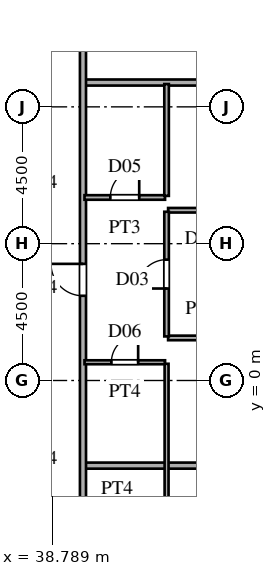
"""IFC4 building model, lengths in metres.
Left out: names, types, materials, properties, quantities, classifications, styles, units other than length and angle.
Written with IfcOpenShell. Run it as: python <this file> out.ifc"""

import sys

from ifc_helpers import new_model, si_unit, direction, frame, frame_2d, origin, place, context, subcontext, project, spatial, rectangle, extrude, source, transform, mapped, element, fill, save


model = new_model("IFC4")
c1 = context("Model", 3, precision=1e-05, world=origin(), true_north=direction((0.0, 1.0)))
c2 = subcontext(c1, "Body", "Model", "MODEL_VIEW")
j1 = project(units=[si_unit("LENGTHUNIT", "METRE"), si_unit("PLANEANGLEUNIT", "RADIAN")], contexts=[c1])
p1 = place(None, origin())
s1 = spatial("IfcSite", under=j1, at=p1, CompositionType="ELEMENT")
p2 = place(p1, origin())
s2 = spatial("IfcBuilding", under=s1, at=p2, CompositionType="ELEMENT")
p3 = place(p2, frame((0.0, 0.0, 117.6)))
s3 = spatial("IfcBuildingStorey", under=s2, at=p3, CompositionType="ELEMENT", Elevation=117.6)
p4 = place(p3, frame((39.88, -2.8, 0.0), z_axis=(0.0, 0.0, 1.0), x_axis=(1.0, 0.0, 0.0)))
e1 = element("IfcWall", 1, at=p4, inside=s3, PredefinedType="PARTITIONING", context=c2, shape_type="SweptSolid", body=[
    extrude(rectangle(XDim=29.625, YDim=0.2, at=frame_2d((14.812, 0.0))), origin(), (0.0, 0.0, 1.0), 3.38),
])
p5 = place(p3, frame((39.85, 0.6, 0.0), z_axis=(0.0, 0.0, 1.0), x_axis=(1.0, 0.0, 0.0)))
e2 = element("IfcWall", 2, at=p5, inside=s3, PredefinedType="PARTITIONING", context=c2, shape_type="SweptSolid", body=[
    extrude(rectangle(XDim=2.65, YDim=0.13, at=frame_2d((1.325, 0.0))), origin(), (0.0, 0.0, 1.0), 3.38),
])
p6 = place(p5, frame((0.885, 0.0, 0.0)))
e3 = element("IfcOpeningElement", 3, at=p6, cuts=e2, PredefinedType="OPENING", context=c2, shape_type="SweptSolid", body=[
    extrude(rectangle(XDim=0.88, YDim=2.1, at=frame_2d((0.44, 1.05))), frame((0.0, 0.075, 0.0), z_axis=(0.0, -1.0, 0.0), x_axis=(1.0, 0.0, 0.0)), (0.0, 0.0, 1.0), 0.15),
])
p7 = place(p3, frame((42.6, 1.4, 0.0), z_axis=(0.0, 0.0, 1.0), x_axis=(1.0, 0.0, 0.0)))
e4 = element("IfcWall", 4, at=p7, inside=s3, PredefinedType="PARTITIONING", context=c2, shape_type="SweptSolid", body=[
    extrude(rectangle(XDim=26.935, YDim=0.15, at=frame_2d((13.467, 0.0))), origin(), (0.0, 0.0, 1.0), 3.38),
])
p8 = place(p7, frame((5.45, 0.0, 0.0)))
e5 = element("IfcOpeningElement", 5, at=p8, cuts=e4, PredefinedType="OPENING", context=c2, shape_type="SweptSolid", body=[
    extrude(rectangle(XDim=0.95, YDim=2.15, at=frame_2d((0.475, 1.075))), frame((0.0, 0.085, 0.0), z_axis=(0.0, -1.0, 0.0), x_axis=(1.0, 0.0, 0.0)), (0.0, 0.0, 1.0), 0.17),
])
p9 = place(p7, frame((14.275, 0.0, 0.0)))
e6 = element("IfcOpeningElement", 6, at=p9, cuts=e4, PredefinedType="OPENING", context=c2, shape_type="SweptSolid", body=[
    extrude(rectangle(XDim=0.95, YDim=2.15, at=frame_2d((0.475, 1.075))), frame((0.0, 0.085, 0.0), z_axis=(0.0, -1.0, 0.0), x_axis=(1.0, 0.0, 0.0)), (0.0, 0.0, 1.0), 0.17),
])
p10 = place(p3, frame((42.6, 5.6, 0.0), z_axis=(0.0, 0.0, 1.0), x_axis=(1.0, 0.0, 0.0)))
e7 = element("IfcWall", 7, at=p10, inside=s3, PredefinedType="PARTITIONING", context=c2, shape_type="SweptSolid", body=[
    extrude(rectangle(XDim=25.766, YDim=0.15, at=frame_2d((12.883, 0.0))), origin(), (0.0, 0.0, 1.0), 3.38),
])
p11 = place(p10, frame((5.45, 0.0, 0.0)))
e8 = element("IfcOpeningElement", 8, at=p11, cuts=e7, PredefinedType="OPENING", context=c2, shape_type="SweptSolid", body=[
    extrude(rectangle(XDim=0.95, YDim=2.15, at=frame_2d((0.475, 1.075))), frame((0.0, 0.085, 0.0), z_axis=(0.0, -1.0, 0.0), x_axis=(1.0, 0.0, 0.0)), (0.0, 0.0, 1.0), 0.17),
])
p12 = place(p10, frame((14.275, 0.0, 0.0)))
e9 = element("IfcOpeningElement", 9, at=p12, cuts=e7, PredefinedType="OPENING", context=c2, shape_type="SweptSolid", body=[
    extrude(rectangle(XDim=0.95, YDim=2.15, at=frame_2d((0.475, 1.075))), frame((0.0, 0.085, 0.0), z_axis=(0.0, -1.0, 0.0), x_axis=(1.0, 0.0, 0.0)), (0.0, 0.0, 1.0), 0.17),
])
p13 = place(p3, frame((39.85, 6.02, 0.0), z_axis=(0.0, 0.0, 1.0), x_axis=(1.0, 0.0, 0.0)))
e10 = element("IfcWall", 10, at=p13, inside=s3, PredefinedType="PARTITIONING", context=c2, shape_type="SweptSolid", body=[
    extrude(rectangle(XDim=2.65, YDim=0.15, at=frame_2d((1.325, 0.0))), origin(), (0.0, 0.0, 1.0), 3.38),
])
p14 = place(p13, frame((0.85, 0.0, 0.0)))
e11 = element("IfcOpeningElement", 11, at=p14, cuts=e10, PredefinedType="OPENING", context=c2, shape_type="SweptSolid", body=[
    extrude(rectangle(XDim=0.95, YDim=2.15, at=frame_2d((0.475, 1.075))), frame((0.0, 0.085, 0.0), z_axis=(0.0, -1.0, 0.0), x_axis=(1.0, 0.0, 0.0)), (0.0, 0.0, 1.0), 0.17),
])
p15 = place(p3, frame((39.88, 9.8, 0.0), z_axis=(0.0, 0.0, 1.0), x_axis=(1.0, 0.0, 0.0)))
e12 = element("IfcWall", 12, at=p15, inside=s3, PredefinedType="PARTITIONING", context=c2, shape_type="SweptSolid", body=[
    extrude(rectangle(XDim=20.277, YDim=0.2, at=frame_2d((10.139, 0.0))), origin(), (0.0, 0.0, 1.0), 3.38),
])
p16 = place(p3, frame((39.8, -15.515, 0.0), z_axis=(0.0, 0.0, 1.0), x_axis=(0.0, 1.0, 0.0)))
e13 = element("IfcWall", 13, at=p16, inside=s3, PredefinedType="PARTITIONING", context=c2, shape_type="SweptSolid", body=[
    extrude(rectangle(XDim=31.03, YDim=0.2, at=frame_2d((15.515, 0.0))), origin(), (0.0, 0.0, 1.0), 3.38),
])
p17 = place(p16, frame((5.762, 0.0, 0.0)))
e14 = element("IfcOpeningElement", 14, at=p17, cuts=e13, PredefinedType="OPENING", context=c2, shape_type="SweptSolid", body=[
    extrude(rectangle(XDim=1.05, YDim=2.25, at=frame_2d((0.525, 1.125))), frame((0.0, 0.11, 0.0), z_axis=(0.0, -1.0, 0.0), x_axis=(1.0, 0.0, 0.0)), (0.0, 0.0, 1.0), 0.22),
])
p18 = place(p16, frame((18.301, 0.0, 0.0)))
e15 = element("IfcOpeningElement", 15, at=p18, cuts=e13, PredefinedType="OPENING", context=c2, shape_type="SweptSolid", body=[
    extrude(rectangle(XDim=1.05, YDim=2.25, at=frame_2d((0.525, 1.125))), frame((0.0, 0.11, 0.0), z_axis=(0.0, -1.0, 0.0), x_axis=(1.0, 0.0, 0.0)), (0.0, 0.0, 1.0), 0.22),
])
p19 = place(p16, frame((27.69, 0.0, 0.0)))
e16 = element("IfcOpeningElement", 16, at=p19, cuts=e13, PredefinedType="OPENING", context=c2, shape_type="SweptSolid", body=[
    extrude(rectangle(XDim=1.05, YDim=2.25, at=frame_2d((0.525, 1.125))), frame((0.0, 0.11, 0.0), z_axis=(0.0, -1.0, 0.0), x_axis=(1.0, 0.0, 0.0)), (0.0, 0.0, 1.0), 0.22),
])
p20 = place(p3, frame((42.55, -7.678, 0.0), z_axis=(0.0, 0.0, 1.0), x_axis=(0.0, 1.0, 0.0)))
e17 = element("IfcWall", 17, at=p20, inside=s3, PredefinedType="PARTITIONING", context=c2, shape_type="SweptSolid", body=[
    extrude(rectangle(XDim=8.228, YDim=0.13, at=frame_2d((4.114, 0.0))), origin(), (0.0, 0.0, 1.0), 3.38),
])
p21 = place(p3, frame((42.55, 1.45, 0.0), z_axis=(0.0, 0.0, 1.0), x_axis=(0.0, 1.0, 0.0)))
e18 = element("IfcWall", 18, at=p21, inside=s3, PredefinedType="PARTITIONING", context=c2, shape_type="SweptSolid", body=[
    extrude(rectangle(XDim=4.1, YDim=0.15, at=frame_2d((2.05, 0.0))), origin(), (0.0, 0.0, 1.0), 3.38),
])
p22 = place(p21, frame((1.575, 0.0, 0.0)))
e19 = element("IfcOpeningElement", 19, at=p22, cuts=e18, PredefinedType="OPENING", context=c2, shape_type="SweptSolid", body=[
    extrude(rectangle(XDim=0.95, YDim=2.15, at=frame_2d((0.475, 1.075))), frame((0.0, 0.085, 0.0), z_axis=(0.0, -1.0, 0.0), x_axis=(1.0, 0.0, 0.0)), (0.0, 0.0, 1.0), 0.17),
])
p23 = place(p3, frame((42.55, 6.072, 0.0), z_axis=(0.0, 0.0, 1.0), x_axis=(0.0, 1.0, 0.0)))
e20 = element("IfcWall", 20, at=p23, inside=s3, PredefinedType="PARTITIONING", context=c2, shape_type="SweptSolid", body=[
    extrude(rectangle(XDim=3.678, YDim=0.15, at=frame_2d((1.839, 0.0))), origin(), (0.0, 0.0, 1.0), 3.38),
])
m1 = source(origin(), c2, "Body", "SweptSolid", [
    extrude(rectangle(XDim=0.88, YDim=2.1, at=frame_2d((0.44, 1.05))), frame((0.0, 0.025, 0.0), z_axis=(0.0, -1.0, 0.0), x_axis=(1.0, 0.0, 0.0)), (0.0, 0.0, 1.0), 0.05),
])
p24 = place(p6, origin())
e21 = element("IfcDoor", 21, at=p24, inside=s3, OperationType="SINGLE_SWING_RIGHT", PredefinedType="DOOR", context=c2, shape_type="MappedRepresentation", body=[
    mapped(m1, transform((0.0, 0.0, 0.0), scale=1.0)),
])
fill(e3, e21)
m2 = source(origin(), c2, "Body", "SweptSolid", [
    extrude(rectangle(XDim=0.95, YDim=2.15, at=frame_2d((0.475, 1.075))), frame((0.0, 0.025, 0.0), z_axis=(0.0, -1.0, 0.0), x_axis=(1.0, 0.0, 0.0)), (0.0, 0.0, 1.0), 0.05),
])
p25 = place(p14, origin())
e22 = element("IfcDoor", 22, at=p25, inside=s3, OperationType="SINGLE_SWING_RIGHT", PredefinedType="DOOR", context=c2, shape_type="MappedRepresentation", body=[
    mapped(m2, transform((0.0, 0.0, 0.0), scale=1.0)),
])
fill(e11, e22)
m3 = source(origin(), c2, "Body", "SweptSolid", [
    extrude(rectangle(XDim=1.05, YDim=2.25, at=frame_2d((0.525, 1.125))), frame((0.0, 0.025, 0.0), z_axis=(0.0, -1.0, 0.0), x_axis=(1.0, 0.0, 0.0)), (0.0, 0.0, 1.0), 0.05),
])
p26 = place(p18, origin())
e23 = element("IfcDoor", 23, at=p26, inside=s3, OperationType="SINGLE_SWING_RIGHT", PredefinedType="DOOR", context=c2, shape_type="MappedRepresentation", body=[
    mapped(m3, transform((0.0, 0.0, 0.0), scale=1.0)),
])
fill(e15, e23)
p27 = place(p22, origin())
e24 = element("IfcDoor", 24, at=p27, inside=s3, OperationType="SINGLE_SWING_LEFT", PredefinedType="DOOR", context=c2, shape_type="MappedRepresentation", body=[
    mapped(m2, transform((0.0, 0.0, 0.0), scale=1.0)),
])
fill(e19, e24)
save(model, sys.argv[1])
